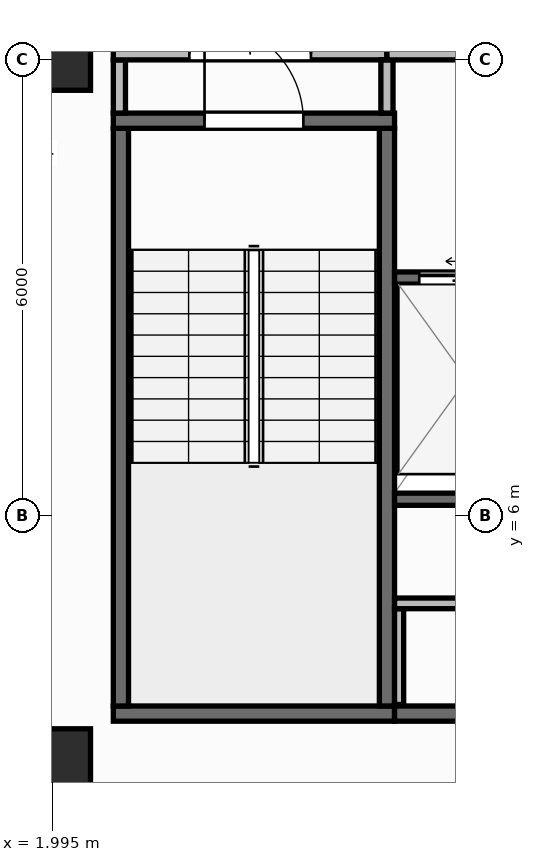
"""IFC4 building model, lengths in metres.
Left out: names, types, materials, properties, quantities, classifications, styles, units other than length and angle.
Written with IfcOpenShell. Run it as: python <this file> out.ifc"""

import sys

from ifc_helpers import new_model, si_unit, direction, frame, frame_2d, origin, origin_2d, place, context, subcontext, project, spatial, rectangle, extrude, element, fill, save


model = new_model("IFC4")
c1 = context("Model", 3, precision=1e-05, world=origin(), true_north=direction((0.0, 1.0)))
c2 = subcontext(c1, "Body", "Model", "MODEL_VIEW")
j1 = project(units=[si_unit("LENGTHUNIT", "METRE"), si_unit("PLANEANGLEUNIT", "RADIAN")], contexts=[c1])
p1 = place(None, origin())
s1 = spatial("IfcSite", under=j1, at=p1, CompositionType="ELEMENT")
p2 = place(p1, origin())
s2 = spatial("IfcBuilding", under=s1, at=p2, CompositionType="ELEMENT")
p3 = place(p2, frame((0.0, 0.0, 260.5)))
s3 = spatial("IfcBuildingStorey", under=s2, at=p3, CompositionType="ELEMENT", Elevation=260.5)
for number, where, z_axis, x_axis in (
    (1, (2.1, 2.8, 0.0), (0.0, 0.0, 1.0), (1.0, 0.0, 0.0)),
    (2, (2.1, 12.0, 0.0), (0.0, 0.0, 1.0), (1.0, 0.0, 0.0)),
):
    element("IfcColumn", number, at=place(p3, frame(where, z_axis=z_axis, x_axis=x_axis)), inside=s3, PredefinedType="COLUMN", context=c2, shape_type="SweptSolid", body=[
        extrude(rectangle(XDim=0.8, YDim=0.8, at=origin_2d()), origin(), (0.0, 0.0, 1.0), 3.95),
    ])
p4 = place(p3, frame((2.56, 0.173, 0.0), z_axis=(0.0, 0.0, 1.0), x_axis=(0.996798206282, 0.079958338856, 0.0)))
e3 = element("IfcWall", 3, at=p4, inside=s3, PredefinedType="STANDARD", context=c2, shape_type="SweptSolid", body=[
    extrude(rectangle(XDim=37.199, YDim=0.26, at=frame_2d((18.6, 0.0))), origin(), (0.0, 0.0, 1.0), 3.71),
])
p5 = place(p4, frame((17.4, 0.0, 0.9)))
e4 = element("IfcOpeningElement", 4, at=p5, cuts=e3, PredefinedType="OPENING", context=c2, shape_type="SweptSolid", body=[
    extrude(rectangle(XDim=2.4, YDim=1.65, at=frame_2d((1.2, 0.825))), frame((0.0, 0.14, 0.0), z_axis=(0.0, -1.0, 0.0), x_axis=(1.0, 0.0, 0.0)), (0.0, 0.0, 1.0), 0.28),
])
p6 = place(p3, frame((2.8, 3.4, 0.0), z_axis=(0.0, 0.0, 1.0), x_axis=(1.0, 0.0, 0.0)))
e5 = element("IfcWall", 5, at=p6, inside=s3, PredefinedType="SHEAR", context=c2, shape_type="SweptSolid", body=[
    extrude(rectangle(XDim=3.7, YDim=0.2, at=frame_2d((1.85, 0.0))), origin(), (0.0, 0.0, 1.0), 3.71),
])
for number, where, z_axis, x_axis in (
    (6, (2.9, 3.5, 0.0), (0.0, 0.0, 1.0), (0.0, 1.0, 0.0)),
    (7, (6.4, 3.5, 0.0), (0.0, 0.0, 1.0), (0.0, 1.0, 0.0)),
):
    element("IfcWall", number, at=place(p3, frame(where, z_axis=z_axis, x_axis=x_axis)), inside=s3, PredefinedType="SHEAR", context=c2, shape_type="SweptSolid", body=[
        extrude(rectangle(XDim=7.6, YDim=0.2, at=frame_2d((3.8, 0.0))), origin(), (0.0, 0.0, 1.0), 3.71),
    ])
p7 = place(p3, frame((2.8, 11.2, 0.0), z_axis=(0.0, 0.0, 1.0), x_axis=(1.0, 0.0, 0.0)))
e8 = element("IfcWall", 8, at=p7, inside=s3, PredefinedType="SHEAR", context=c2, shape_type="SweptSolid", body=[
    extrude(rectangle(XDim=3.7, YDim=0.2, at=frame_2d((1.85, 0.0))), origin(), (0.0, 0.0, 1.0), 3.71),
])
p8 = place(p7, frame((1.2, 0.0, 0.0)))
e9 = element("IfcOpeningElement", 9, at=p8, cuts=e8, PredefinedType="OPENING", context=c2, shape_type="SweptSolid", body=[
    extrude(rectangle(XDim=1.3, YDim=2.15, at=frame_2d((0.65, 1.075))), frame((0.0, 0.11, 0.0), z_axis=(0.0, -1.0, 0.0), x_axis=(1.0, 0.0, 0.0)), (0.0, 0.0, 1.0), 0.22),
])
p9 = place(p3, frame((6.5, 3.4, 0.0), z_axis=(0.0, 0.0, 1.0), x_axis=(1.0, 0.0, 0.0)))
e10 = element("IfcWall", 10, at=p9, inside=s3, PredefinedType="SHEAR", context=c2, shape_type="SweptSolid", body=[
    extrude(rectangle(XDim=13.7, YDim=0.2, at=frame_2d((6.85, 0.0))), origin(), (0.0, 0.0, 1.0), 3.71),
])
p10 = place(p3, frame((6.5, 6.22, 0.0), z_axis=(0.0, 0.0, 1.0), x_axis=(1.0, 0.0, 0.0)))
e11 = element("IfcWall", 11, at=p10, inside=s3, PredefinedType="SHEAR", context=c2, shape_type="SweptSolid", body=[
    extrude(rectangle(XDim=12.11, YDim=0.16, at=frame_2d((6.055, 0.0))), origin(), (0.0, 0.0, 1.0), 3.71),
])
p11 = place(p3, frame((6.5, 9.13, 0.0), z_axis=(0.0, 0.0, 1.0), x_axis=(1.0, 0.0, 0.0)))
e12 = element("IfcWall", 12, at=p11, inside=s3, PredefinedType="SHEAR", context=c2, shape_type="SweptSolid", body=[
    extrude(rectangle(XDim=1.975, YDim=0.16, at=frame_2d((0.988, 0.0))), origin(), (0.0, 0.0, 1.0), 3.71),
])
p12 = place(p11, frame((0.325, 0.0, 0.0)))
e13 = element("IfcOpeningElement", 13, at=p12, cuts=e12, PredefinedType="OPENING", context=c2, shape_type="SweptSolid", body=[
    extrude(rectangle(XDim=1.25, YDim=2.15, at=frame_2d((0.625, 1.075))), frame((0.0, 0.09, 0.0), z_axis=(0.0, -1.0, 0.0), x_axis=(1.0, 0.0, 0.0)), (0.0, 0.0, 1.0), 0.18),
])
p13 = place(p3, frame((6.56, 3.52, 0.0), z_axis=(0.0, 0.0, 1.0), x_axis=(0.0, 1.0, 0.0)))
e14 = element("IfcWall", 14, at=p13, inside=s3, PredefinedType="PARTITIONING", context=c2, shape_type="SweptSolid", body=[
    extrude(rectangle(XDim=1.26, YDim=0.12, at=frame_2d((0.63, 0.0))), origin(), (0.0, 0.0, 1.0), 3.71),
])
p14 = place(p3, frame((6.5, 4.85, 0.0), z_axis=(0.0, 0.0, 1.0), x_axis=(1.0, 0.0, 0.0)))
e15 = element("IfcWall", 15, at=p14, inside=s3, PredefinedType="PARTITIONING", context=c2, shape_type="SweptSolid", body=[
    extrude(rectangle(XDim=5.67, YDim=0.14, at=frame_2d((2.835, 0.0))), origin(), (0.0, 0.0, 1.0), 3.71),
])
p15 = place(p14, frame((2.285, 0.0, 0.0)))
e16 = element("IfcOpeningElement", 16, at=p15, cuts=e15, PredefinedType="OPENING", context=c2, shape_type="SweptSolid", body=[
    extrude(rectangle(XDim=1.1, YDim=2.1, at=frame_2d((0.55, 1.05))), frame((0.0, 0.08, 0.0), z_axis=(0.0, -1.0, 0.0), x_axis=(1.0, 0.0, 0.0)), (0.0, 0.0, 1.0), 0.16),
])
p16 = place(p3, frame((2.88, 11.3, 0.0), z_axis=(0.0, 0.0, 1.0), x_axis=(0.0, 1.0, 0.0)))
e17 = element("IfcWall", 17, at=p16, inside=s3, PredefinedType="PARTITIONING", context=c2, shape_type="SweptSolid", body=[
    extrude(rectangle(XDim=0.7, YDim=0.16, at=frame_2d((0.35, 0.0))), origin(), (0.0, 0.0, 1.0), 3.71),
])
p17 = place(p3, frame((2.8, 12.08, 0.0), z_axis=(0.0, 0.0, 1.0), x_axis=(1.0, 0.0, 0.0)))
e18 = element("IfcWall", 18, at=p17, inside=s3, PredefinedType="PARTITIONING", context=c2, shape_type="SweptSolid", body=[
    extrude(rectangle(XDim=3.6, YDim=0.16, at=frame_2d((1.8, 0.0))), origin(), (0.0, 0.0, 1.0), 3.157),
])
p18 = place(p17, frame((1.0, 0.0, 0.0)))
e19 = element("IfcOpeningElement", 19, at=p18, cuts=e18, PredefinedType="OPENING", context=c2, shape_type="SweptSolid", body=[
    extrude(rectangle(XDim=1.6, YDim=2.05, at=frame_2d((0.8, 1.025))), frame((0.0, 0.09, 0.0), z_axis=(0.0, -1.0, 0.0), x_axis=(1.0, 0.0, 0.0)), (0.0, 0.0, 1.0), 0.18),
])
p19 = place(p3, frame((6.4, 11.3, 0.0), z_axis=(0.0, 0.0, 1.0), x_axis=(0.0, 1.0, 0.0)))
e20 = element("IfcWall", 20, at=p19, inside=s3, PredefinedType="PARTITIONING", context=c2, shape_type="SweptSolid", body=[
    extrude(rectangle(XDim=0.7, YDim=0.16, at=frame_2d((0.35, 0.0))), origin(), (0.0, 0.0, 1.0), 3.71),
])
p20 = place(p3, frame((6.4, 12.08, 0.0), z_axis=(0.0, 0.0, 1.0), x_axis=(1.0, 0.0, 0.0)))
e21 = element("IfcWall", 21, at=p20, inside=s3, PredefinedType="PARTITIONING", context=c2, shape_type="SweptSolid", body=[
    extrude(rectangle(XDim=6.18, YDim=0.16, at=frame_2d((3.09, 0.0))), origin(), (0.0, 0.0, 1.0), 3.157),
])
p21 = place(p20, frame((2.29, 0.0, 0.0)))
e22 = element("IfcOpeningElement", 22, at=p21, cuts=e21, PredefinedType="OPENING", context=c2, shape_type="SweptSolid", body=[
    extrude(rectangle(XDim=1.6, YDim=2.05, at=frame_2d((0.8, 1.025))), frame((0.0, 0.09, 0.0), z_axis=(0.0, -1.0, 0.0), x_axis=(1.0, 0.0, 0.0)), (0.0, 0.0, 1.0), 0.18),
])
p22 = place(p8, origin())
e23 = element("IfcDoor", 23, at=p22, inside=s3, OperationType="SINGLE_SWING_LEFT", PredefinedType="DOOR", context=c2, shape_type="SweptSolid", body=[
    extrude(rectangle(XDim=1.3, YDim=2.15, at=frame_2d((0.65, 1.075))), frame((0.0, 0.025, 0.0), z_axis=(0.0, -1.0, 0.0), x_axis=(1.0, 0.0, 0.0)), (0.0, 0.0, 1.0), 0.05),
])
fill(e9, e23)
p23 = place(p12, origin())
e24 = element("IfcDoor", 24, at=p23, inside=s3, OperationType="SLIDING_TO_LEFT", PredefinedType="DOOR", context=c2, shape_type="SweptSolid", body=[
    extrude(rectangle(XDim=1.25, YDim=2.15, at=frame_2d((0.625, 1.075))), frame((0.0, 0.025, 0.0), z_axis=(0.0, -1.0, 0.0), x_axis=(1.0, 0.0, 0.0)), (0.0, 0.0, 1.0), 0.05),
])
fill(e13, e24)
p24 = place(p18, origin())
e25 = element("IfcDoor", 25, at=p24, inside=s3, OperationType="DOUBLE_DOOR_SINGLE_SWING", PredefinedType="DOOR", context=c2, shape_type="SweptSolid", body=[
    extrude(rectangle(XDim=1.6, YDim=2.05, at=frame_2d((0.8, 1.025))), frame((0.0, 0.025, 0.0), z_axis=(0.0, -1.0, 0.0), x_axis=(1.0, 0.0, 0.0)), (0.0, 0.0, 1.0), 0.05),
])
fill(e19, e25)
save(model, sys.argv[1])
